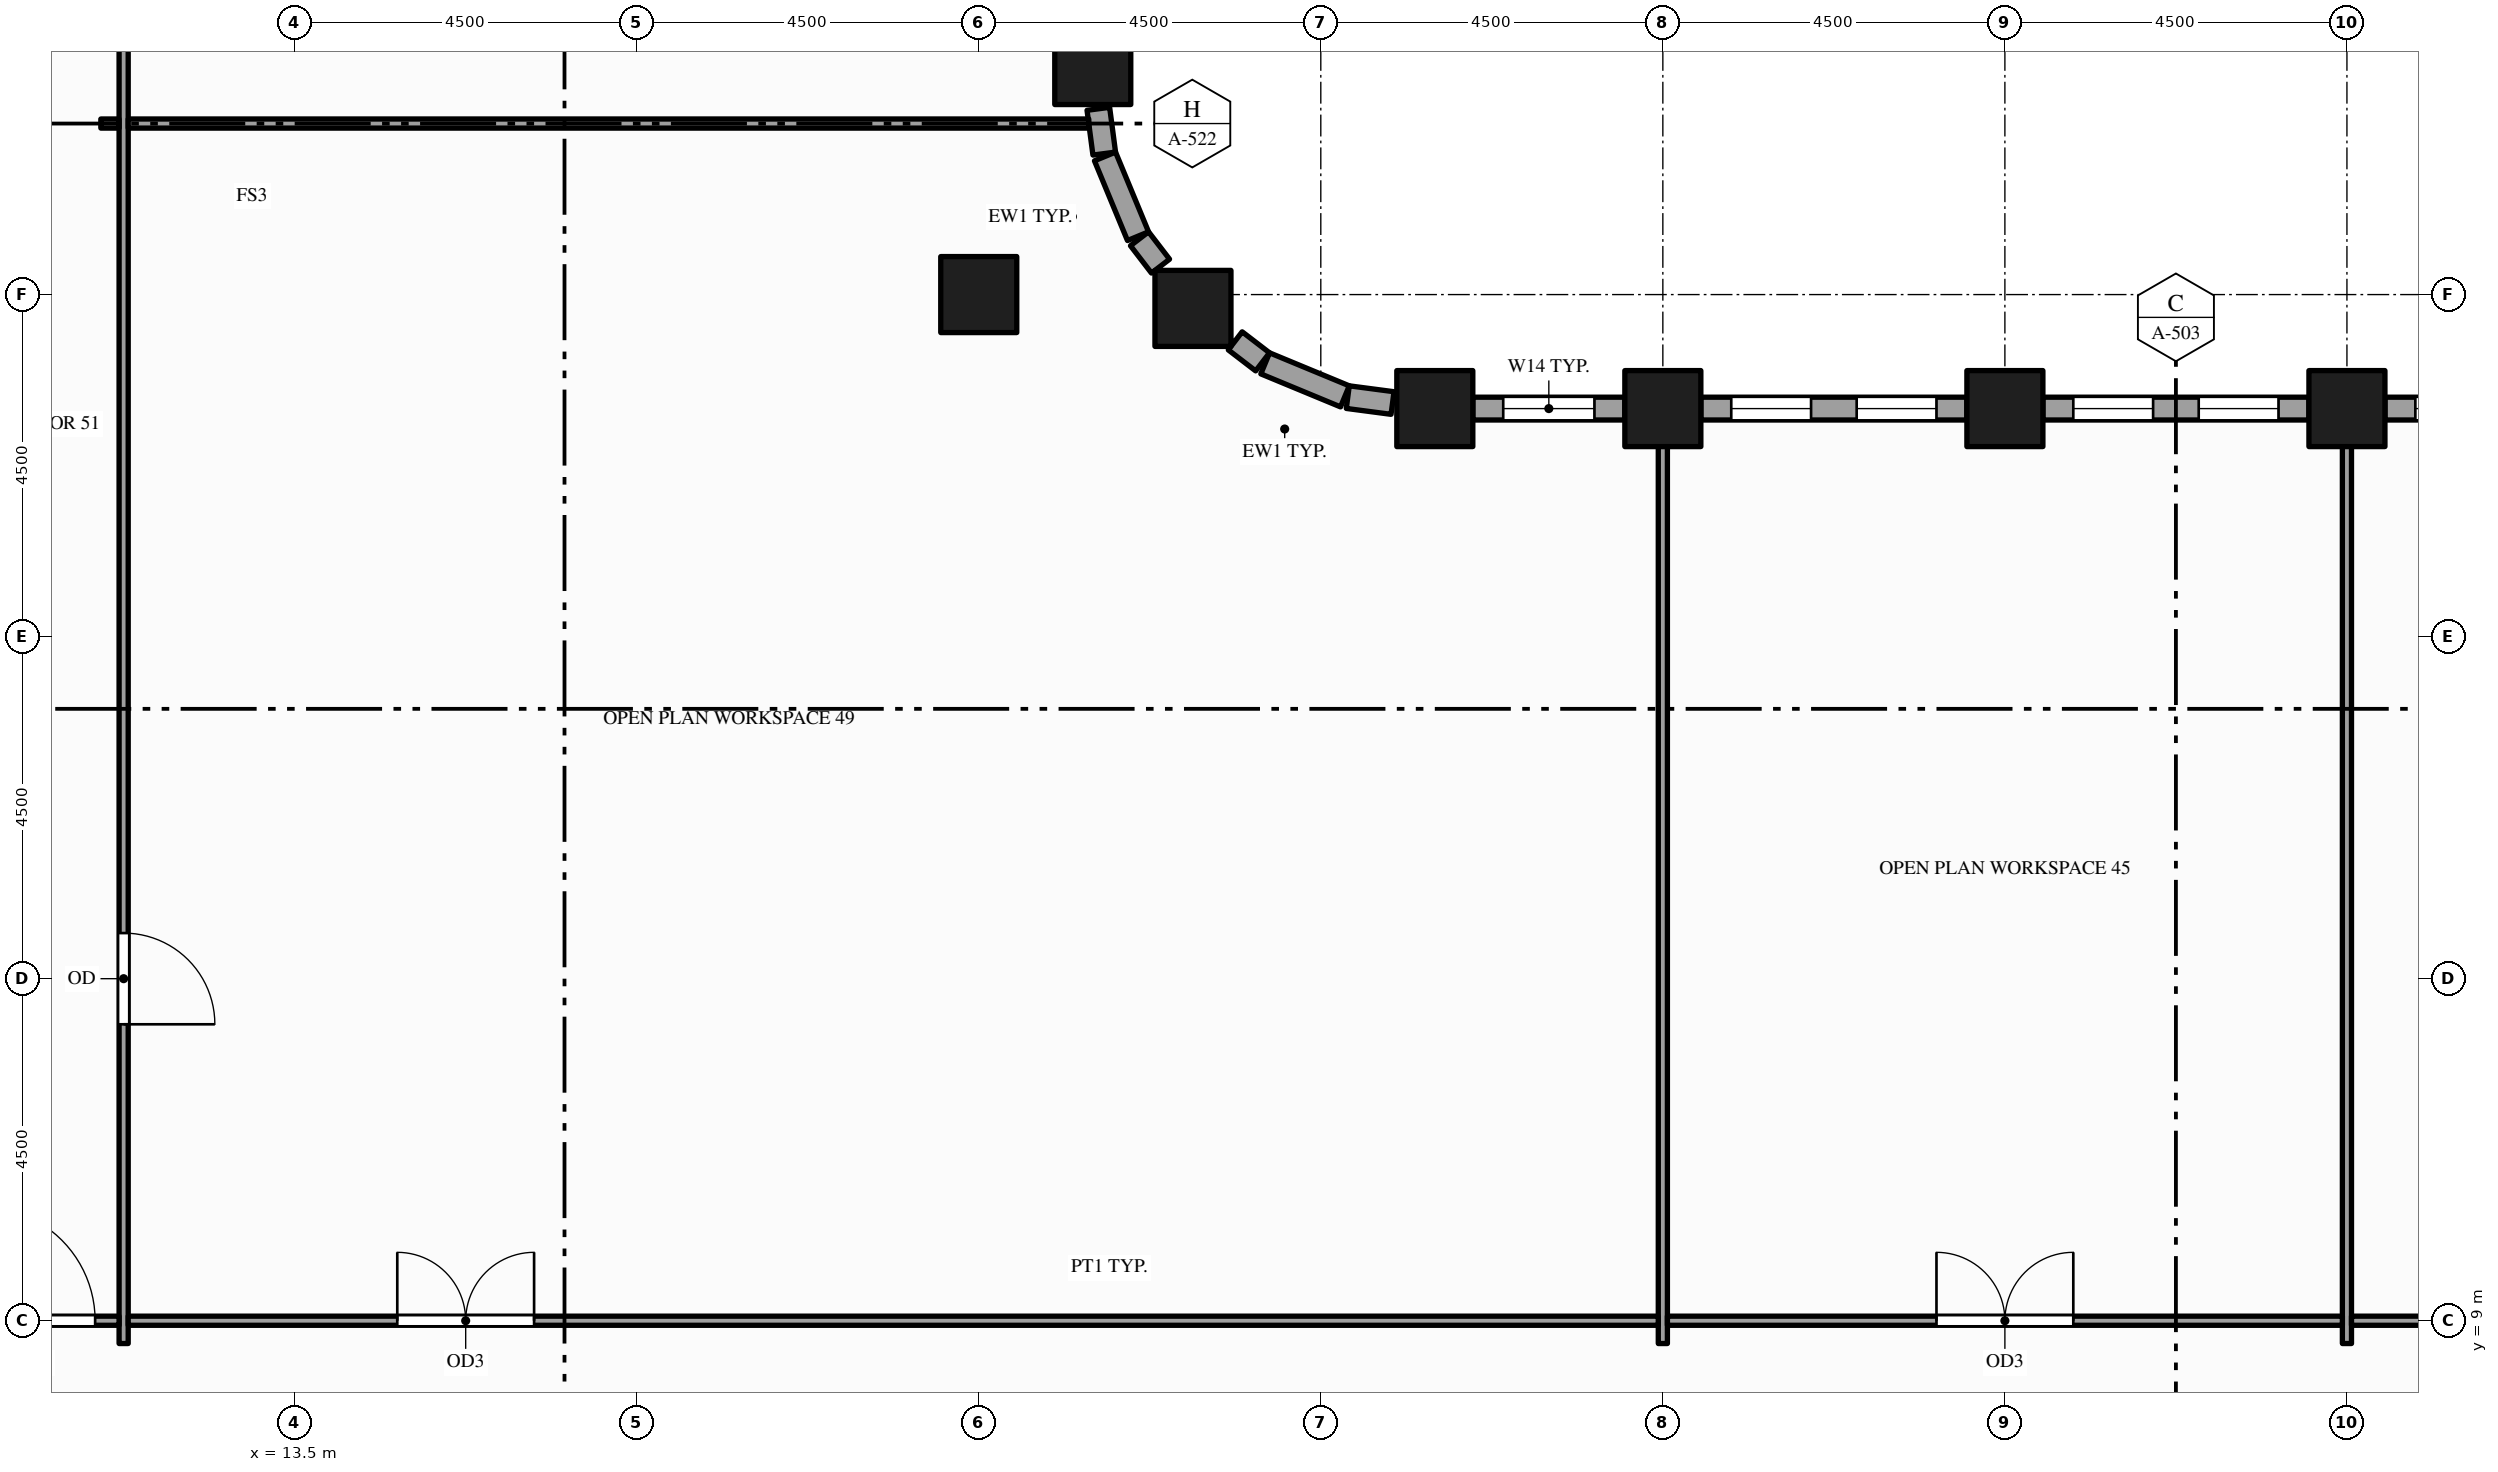
"""IFC4 building model, lengths in metres.
Left out: names, types, materials, properties, quantities, classifications, styles, units other than length and angle.
Written with IfcOpenShell. Run it as: python <this file> out.ifc"""

import sys

from ifc_helpers import new_model, si_unit, direction, frame, frame_2d, origin, origin_2d, place, context, subcontext, project, spatial, rectangle, hollow_rectangle, extrude, element, fill, save


model = new_model("IFC4")
c1 = context("Model", 3, precision=1e-05, world=origin(), true_north=direction((0.0, 1.0)))
c2 = subcontext(c1, "Body", "Model", "MODEL_VIEW")
j1 = project(units=[si_unit("LENGTHUNIT", "METRE"), si_unit("PLANEANGLEUNIT", "RADIAN")], contexts=[c1])
p1 = place(None, origin())
s1 = spatial("IfcSite", under=j1, at=p1, CompositionType="ELEMENT")
p2 = place(p1, origin())
s2 = spatial("IfcBuilding", under=s1, at=p2, CompositionType="ELEMENT")
p3 = place(p2, frame((0.0, 0.0, 103.0)))
s3 = spatial("IfcBuildingStorey", under=s2, at=p3, CompositionType="ELEMENT", Elevation=103.0)
for number, where, z_axis, x_axis in (
    (1, (22.5, 22.5, -0.15), (0.0, 0.0, 1.0), (1.0, 0.0, 0.0)),
    (2, (24.0, 25.5, -0.15), (0.0, 0.0, 1.0), (1.0, 0.0, 0.0)),
    (3, (25.318, 22.318, -0.15), (0.0, 0.0, 1.0), (1.0, 0.0, 0.0)),
    (4, (28.5, 21.0, -0.15), (0.0, 0.0, 1.0), (1.0, 0.0, 0.0)),
    (5, (31.5, 21.0, -0.15), (0.0, 0.0, 1.0), (1.0, 0.0, 0.0)),
    (6, (36.0, 21.0, -0.15), (0.0, 0.0, 1.0), (1.0, 0.0, 0.0)),
    (7, (40.5, 21.0, -0.15), (0.0, 0.0, 1.0), (1.0, 0.0, 0.0)),
):
    element("IfcColumn", number, at=place(p3, frame(where, z_axis=z_axis, x_axis=x_axis)), inside=s3, PredefinedType="COLUMN", context=c2, shape_type="SweptSolid", body=[
        extrude(hollow_rectangle(XDim=1.0, YDim=1.0, WallThickness=0.05, at=origin_2d()), origin(), (0.0, 0.0, 1.0), 4.0),
    ])
p4 = place(p3, frame((44.5, 21.0, 0.0), z_axis=(0.0, 0.0, 1.0), x_axis=(-1.0, 0.0, 0.0)))
e8 = element("IfcWall", 8, at=p4, inside=s3, PredefinedType="STANDARD", context=c2, shape_type="SweptSolid", body=[
    extrude(rectangle(XDim=3.5, YDim=0.3, at=frame_2d((1.75, 0.0))), origin(), (0.0, 0.0, 1.0), 3.154),
])
p5 = place(p4, frame((0.4, 0.0, 0.9)))
e9 = element("IfcOpeningElement", 9, at=p5, cuts=e8, PredefinedType="OPENING", context=c2, shape_type="SweptSolid", body=[
    extrude(rectangle(XDim=1.05, YDim=2.0, at=frame_2d((0.525, 1.0))), frame((0.0, 0.16, 0.0), z_axis=(0.0, -1.0, 0.0), x_axis=(1.0, 0.0, 0.0)), (0.0, 0.0, 1.0), 0.32),
])
p6 = place(p4, frame((2.05, 0.0, 0.9)))
e10 = element("IfcOpeningElement", 10, at=p6, cuts=e8, PredefinedType="OPENING", context=c2, shape_type="SweptSolid", body=[
    extrude(rectangle(XDim=1.05, YDim=2.0, at=frame_2d((0.525, 1.0))), frame((0.0, 0.16, 0.0), z_axis=(0.0, -1.0, 0.0), x_axis=(1.0, 0.0, 0.0)), (0.0, 0.0, 1.0), 0.32),
])
p7 = place(p3, frame((40.0, 21.0, 0.0), z_axis=(0.0, 0.0, 1.0), x_axis=(-1.0, 0.0, 0.0)))
e11 = element("IfcWall", 11, at=p7, inside=s3, PredefinedType="STANDARD", context=c2, shape_type="SweptSolid", body=[
    extrude(rectangle(XDim=3.5, YDim=0.3, at=frame_2d((1.75, 0.0))), origin(), (0.0, 0.0, 1.0), 3.154),
])
p8 = place(p7, frame((0.4, 0.0, 0.9)))
e12 = element("IfcOpeningElement", 12, at=p8, cuts=e11, PredefinedType="OPENING", context=c2, shape_type="SweptSolid", body=[
    extrude(rectangle(XDim=1.05, YDim=2.0, at=frame_2d((0.525, 1.0))), frame((0.0, 0.16, 0.0), z_axis=(0.0, -1.0, 0.0), x_axis=(1.0, 0.0, 0.0)), (0.0, 0.0, 1.0), 0.32),
])
p9 = place(p7, frame((2.05, 0.0, 0.9)))
e13 = element("IfcOpeningElement", 13, at=p9, cuts=e11, PredefinedType="OPENING", context=c2, shape_type="SweptSolid", body=[
    extrude(rectangle(XDim=1.05, YDim=2.0, at=frame_2d((0.525, 1.0))), frame((0.0, 0.16, 0.0), z_axis=(0.0, -1.0, 0.0), x_axis=(1.0, 0.0, 0.0)), (0.0, 0.0, 1.0), 0.32),
])
p10 = place(p3, frame((35.5, 21.0, 0.0), z_axis=(0.0, 0.0, 1.0), x_axis=(-1.0, 0.0, 0.0)))
e14 = element("IfcWall", 14, at=p10, inside=s3, PredefinedType="STANDARD", context=c2, shape_type="SweptSolid", body=[
    extrude(rectangle(XDim=3.5, YDim=0.3, at=frame_2d((1.75, 0.0))), origin(), (0.0, 0.0, 1.0), 3.154),
])
p11 = place(p10, frame((0.4, 0.0, 0.9)))
e15 = element("IfcOpeningElement", 15, at=p11, cuts=e14, PredefinedType="OPENING", context=c2, shape_type="SweptSolid", body=[
    extrude(rectangle(XDim=1.05, YDim=2.0, at=frame_2d((0.525, 1.0))), frame((0.0, 0.16, 0.0), z_axis=(0.0, -1.0, 0.0), x_axis=(1.0, 0.0, 0.0)), (0.0, 0.0, 1.0), 0.32),
])
p12 = place(p10, frame((2.05, 0.0, 0.9)))
e16 = element("IfcOpeningElement", 16, at=p12, cuts=e14, PredefinedType="OPENING", context=c2, shape_type="SweptSolid", body=[
    extrude(rectangle(XDim=1.05, YDim=2.0, at=frame_2d((0.525, 1.0))), frame((0.0, 0.16, 0.0), z_axis=(0.0, -1.0, 0.0), x_axis=(1.0, 0.0, 0.0)), (0.0, 0.0, 1.0), 0.32),
])
p13 = place(p3, frame((31.0, 21.0, 0.0), z_axis=(0.0, 0.0, 1.0), x_axis=(-1.0, 0.0, 0.0)))
e17 = element("IfcWall", 17, at=p13, inside=s3, PredefinedType="STANDARD", context=c2, shape_type="SweptSolid", body=[
    extrude(rectangle(XDim=2.0, YDim=0.3, at=frame_2d((1.0, 0.0))), origin(), (0.0, 0.0, 1.0), 3.154),
])
p14 = place(p13, frame((0.4, 0.0, 0.9)))
e18 = element("IfcOpeningElement", 18, at=p14, cuts=e17, PredefinedType="OPENING", context=c2, shape_type="SweptSolid", body=[
    extrude(rectangle(XDim=1.2, YDim=2.0, at=frame_2d((0.6, 1.0))), frame((0.0, 0.16, 0.0), z_axis=(0.0, -1.0, 0.0), x_axis=(1.0, 0.0, 0.0)), (0.0, 0.0, 1.0), 0.32),
])
p15 = place(p3, frame((27.944, 21.073, 0.0), z_axis=(0.0, 0.0, 1.0), x_axis=(-0.991420685839, 0.130709692412, 0.0)))
e19 = element("IfcWall", 19, at=p15, inside=s3, PredefinedType="STANDARD", context=c2, shape_type="SweptSolid", body=[
    extrude(rectangle(XDim=0.594, YDim=0.3, at=frame_2d((0.297, 0.0))), origin(), (0.0, 0.0, 1.0), 3.154),
])
p16 = place(p3, frame((27.317, 21.161, 0.0), z_axis=(0.0, 0.0, 1.0), x_axis=(-0.923914616768, 0.382598720491, 0.0)))
e20 = element("IfcWall", 20, at=p16, inside=s3, PredefinedType="STANDARD", context=c2, shape_type="SweptSolid", body=[
    extrude(rectangle(XDim=1.135, YDim=0.3, at=frame_2d((0.568, 0.0))), origin(), (0.0, 0.0, 1.0), 2.938),
])
p17 = place(p3, frame((26.234, 21.615, 0.0), z_axis=(0.0, 0.0, 1.0), x_axis=(-0.793563062559, 0.608488016104, 0.0)))
e21 = element("IfcWall", 21, at=p17, inside=s3, PredefinedType="STANDARD", context=c2, shape_type="SweptSolid", body=[
    extrude(rectangle(XDim=0.454, YDim=0.3, at=frame_2d((0.227, 0.0))), origin(), (0.0, 0.0, 1.0), 3.154),
])
p18 = place(p3, frame((24.891, 22.874, 0.0), z_axis=(0.0, 0.0, 1.0), x_axis=(-0.608488016104, 0.793563062559, 0.0)))
e22 = element("IfcWall", 22, at=p18, inside=s3, PredefinedType="STANDARD", context=c2, shape_type="SweptSolid", body=[
    extrude(rectangle(XDim=0.454, YDim=0.3, at=frame_2d((0.227, 0.0))), origin(), (0.0, 0.0, 1.0), 2.76),
])
p19 = place(p3, frame((24.595, 23.268, 0.0), z_axis=(0.0, 0.0, 1.0), x_axis=(-0.382598720491, 0.923914616768, 0.0)))
e23 = element("IfcWall", 23, at=p19, inside=s3, PredefinedType="STANDARD", context=c2, shape_type="SweptSolid", body=[
    extrude(rectangle(XDim=1.135, YDim=0.3, at=frame_2d((0.568, 0.0))), origin(), (0.0, 0.0, 1.0), 3.154),
])
p20 = place(p3, frame((24.151, 24.355, 0.0), z_axis=(0.0, 0.0, 1.0), x_axis=(-0.130709692412, 0.991420685839, 0.0)))
e24 = element("IfcWall", 24, at=p20, inside=s3, PredefinedType="STANDARD", context=c2, shape_type="SweptSolid", body=[
    extrude(rectangle(XDim=0.594, YDim=0.3, at=frame_2d((0.297, 0.0))), origin(), (0.0, 0.0, 1.0), 3.154),
])
p21 = place(p3, frame((11.25, 8.7, 0.0), z_axis=(0.0, 0.0, 1.0), x_axis=(0.0, 1.0, 0.0)))
e25 = element("IfcWall", 25, at=p21, inside=s3, PredefinedType="PARTITIONING", context=c2, shape_type="SweptSolid", body=[
    extrude(rectangle(XDim=23.1, YDim=0.12, at=frame_2d((11.55, 0.0))), origin(), (0.0, 0.0, 1.0), 2.6),
])
p22 = place(p21, frame((18.925, 0.0, 0.0)))
e26 = element("IfcOpeningElement", 26, at=p22, cuts=e25, PredefinedType="OPENING", context=c2, shape_type="SweptSolid", body=[
    extrude(rectangle(XDim=1.0, YDim=2.1, at=frame_2d((0.5, 1.05))), frame((0.0, 0.07, 0.0), z_axis=(0.0, -1.0, 0.0), x_axis=(1.0, 0.0, 0.0)), (0.0, 0.0, 1.0), 0.14),
])
p23 = place(p21, frame((4.2, 0.0, 0.0)))
e27 = element("IfcOpeningElement", 27, at=p23, cuts=e25, PredefinedType="OPENING", context=c2, shape_type="SweptSolid", body=[
    extrude(rectangle(XDim=1.2, YDim=2.1, at=frame_2d((0.6, 1.05))), frame((0.0, 0.07, 0.0), z_axis=(0.0, -1.0, 0.0), x_axis=(1.0, 0.0, 0.0)), (0.0, 0.0, 1.0), 0.14),
])
for number, where, z_axis, x_axis in (
    (28, (31.5, 8.7, 0.0), (0.0, 0.0, 1.0), (0.0, 1.0, 0.0)),
    (29, (40.5, 8.7, 0.0), (0.0, 0.0, 1.0), (0.0, 1.0, 0.0)),
):
    element("IfcWall", number, at=place(p3, frame(where, z_axis=z_axis, x_axis=x_axis)), inside=s3, PredefinedType="PARTITIONING", context=c2, shape_type="SweptSolid", body=[
        extrude(rectangle(XDim=12.15, YDim=0.12, at=frame_2d((6.075, 0.0))), origin(), (0.0, 0.0, 1.0), 2.938),
    ])
p24 = place(p3, frame((9.06, 9.0, 0.0), z_axis=(0.0, 0.0, 1.0), x_axis=(1.0, 0.0, 0.0)))
e30 = element("IfcWall", 30, at=p24, inside=s3, PredefinedType="PARTITIONING", context=c2, shape_type="SweptSolid", body=[
    extrude(rectangle(XDim=2.13, YDim=0.12, at=frame_2d((1.065, 0.0))), origin(), (0.0, 0.0, 1.0), 2.938),
])
p25 = place(p24, frame((0.315, 0.0, 0.0)))
e31 = element("IfcOpeningElement", 31, at=p25, cuts=e30, PredefinedType="OPENING", context=c2, shape_type="SweptSolid", body=[
    extrude(rectangle(XDim=1.5, YDim=2.1, at=frame_2d((0.75, 1.05))), frame((0.0, 0.07, 0.0), z_axis=(0.0, -1.0, 0.0), x_axis=(1.0, 0.0, 0.0)), (0.0, 0.0, 1.0), 0.14),
])
p26 = place(p3, frame((11.31, 9.0, 0.0), z_axis=(0.0, 0.0, 1.0), x_axis=(1.0, 0.0, 0.0)))
e32 = element("IfcWall", 32, at=p26, inside=s3, PredefinedType="PARTITIONING", context=c2, shape_type="SweptSolid", body=[
    extrude(rectangle(XDim=20.13, YDim=0.12, at=frame_2d((10.065, 0.0))), origin(), (0.0, 0.0, 1.0), 2.76),
])
p27 = place(p26, frame((3.54, 0.0, 0.0)))
e33 = element("IfcOpeningElement", 33, at=p27, cuts=e32, PredefinedType="OPENING", context=c2, shape_type="SweptSolid", body=[
    extrude(rectangle(XDim=1.8, YDim=2.1, at=frame_2d((0.9, 1.05))), frame((0.0, 0.07, 0.0), z_axis=(0.0, -1.0, 0.0), x_axis=(1.0, 0.0, 0.0)), (0.0, 0.0, 1.0), 0.14),
])
p28 = place(p3, frame((31.56, 9.0, 0.0), z_axis=(0.0, 0.0, 1.0), x_axis=(1.0, 0.0, 0.0)))
e34 = element("IfcWall", 34, at=p28, inside=s3, PredefinedType="PARTITIONING", context=c2, shape_type="SweptSolid", body=[
    extrude(rectangle(XDim=8.88, YDim=0.12, at=frame_2d((4.44, 0.0))), origin(), (0.0, 0.0, 1.0), 2.938),
])
p29 = place(p28, frame((3.54, 0.0, 0.0)))
e35 = element("IfcOpeningElement", 35, at=p29, cuts=e34, PredefinedType="OPENING", context=c2, shape_type="SweptSolid", body=[
    extrude(rectangle(XDim=1.8, YDim=2.1, at=frame_2d((0.9, 1.05))), frame((0.0, 0.07, 0.0), z_axis=(0.0, -1.0, 0.0), x_axis=(1.0, 0.0, 0.0)), (0.0, 0.0, 1.0), 0.14),
])
p30 = place(p3, frame((40.56, 9.0, 0.0), z_axis=(0.0, 0.0, 1.0), x_axis=(1.0, 0.0, 0.0)))
e36 = element("IfcWall", 36, at=p30, inside=s3, PredefinedType="PARTITIONING", context=c2, shape_type="SweptSolid", body=[
    extrude(rectangle(XDim=4.38, YDim=0.12, at=frame_2d((2.19, 0.0))), origin(), (0.0, 0.0, 1.0), 2.938),
])
p31 = place(p30, frame((1.59, 0.0, 0.0)))
e37 = element("IfcOpeningElement", 37, at=p31, cuts=e36, PredefinedType="OPENING", context=c2, shape_type="SweptSolid", body=[
    extrude(rectangle(XDim=1.2, YDim=2.1, at=frame_2d((0.6, 1.05))), frame((0.0, 0.07, 0.0), z_axis=(0.0, -1.0, 0.0), x_axis=(1.0, 0.0, 0.0)), (0.0, 0.0, 1.0), 0.14),
])
p32 = place(p3, frame((10.95, 24.75, 0.0), z_axis=(0.0, 0.0, 1.0), x_axis=(1.0, 0.0, 0.0)))
e38 = element("IfcWall", 38, at=p32, inside=s3, PredefinedType="PARTITIONING", context=c2, shape_type="SweptSolid", body=[
    extrude(rectangle(XDim=0.24, YDim=0.12, at=frame_2d((0.12, 0.0))), origin(), (0.0, 0.0, 1.0), 2.938),
])
p33 = place(p3, frame((11.31, 24.75, 0.0), z_axis=(0.0, 0.0, 1.0), x_axis=(1.0, 0.0, 0.0)))
e39 = element("IfcWall", 39, at=p33, inside=s3, PredefinedType="PARTITIONING", context=c2, shape_type="SweptSolid", body=[
    extrude(rectangle(XDim=12.637, YDim=0.12, at=frame_2d((6.319, 0.0))), origin(), (0.0, 0.0, 1.0), 2.938),
])
p34 = place(p6, origin())
e40 = element("IfcWindow", 40, at=p34, inside=s3, PartitioningType="SINGLE_PANEL", PredefinedType="WINDOW", context=c2, shape_type="SweptSolid", body=[
    extrude(rectangle(XDim=1.05, YDim=2.0, at=frame_2d((0.525, 1.0))), frame((0.0, 0.03, 0.0), z_axis=(0.0, -1.0, 0.0), x_axis=(1.0, 0.0, 0.0)), (0.0, 0.0, 1.0), 0.06),
])
fill(e10, e40)
p35 = place(p8, origin())
e41 = element("IfcWindow", 41, at=p35, inside=s3, PartitioningType="SINGLE_PANEL", PredefinedType="WINDOW", context=c2, shape_type="SweptSolid", body=[
    extrude(rectangle(XDim=1.05, YDim=2.0, at=frame_2d((0.525, 1.0))), frame((0.0, 0.03, 0.0), z_axis=(0.0, -1.0, 0.0), x_axis=(1.0, 0.0, 0.0)), (0.0, 0.0, 1.0), 0.06),
])
fill(e12, e41)
p36 = place(p9, origin())
e42 = element("IfcWindow", 42, at=p36, inside=s3, PartitioningType="SINGLE_PANEL", PredefinedType="WINDOW", context=c2, shape_type="SweptSolid", body=[
    extrude(rectangle(XDim=1.05, YDim=2.0, at=frame_2d((0.525, 1.0))), frame((0.0, 0.03, 0.0), z_axis=(0.0, -1.0, 0.0), x_axis=(1.0, 0.0, 0.0)), (0.0, 0.0, 1.0), 0.06),
])
fill(e13, e42)
p37 = place(p11, origin())
e43 = element("IfcWindow", 43, at=p37, inside=s3, PartitioningType="SINGLE_PANEL", PredefinedType="WINDOW", context=c2, shape_type="SweptSolid", body=[
    extrude(rectangle(XDim=1.05, YDim=2.0, at=frame_2d((0.525, 1.0))), frame((0.0, 0.03, 0.0), z_axis=(0.0, -1.0, 0.0), x_axis=(1.0, 0.0, 0.0)), (0.0, 0.0, 1.0), 0.06),
])
fill(e15, e43)
p38 = place(p12, origin())
e44 = element("IfcWindow", 44, at=p38, inside=s3, PartitioningType="SINGLE_PANEL", PredefinedType="WINDOW", context=c2, shape_type="SweptSolid", body=[
    extrude(rectangle(XDim=1.05, YDim=2.0, at=frame_2d((0.525, 1.0))), frame((0.0, 0.03, 0.0), z_axis=(0.0, -1.0, 0.0), x_axis=(1.0, 0.0, 0.0)), (0.0, 0.0, 1.0), 0.06),
])
fill(e16, e44)
p39 = place(p14, origin())
e45 = element("IfcWindow", 45, at=p39, inside=s3, PartitioningType="SINGLE_PANEL", PredefinedType="WINDOW", context=c2, shape_type="SweptSolid", body=[
    extrude(rectangle(XDim=1.2, YDim=2.0, at=frame_2d((0.6, 1.0))), frame((0.0, 0.03, 0.0), z_axis=(0.0, -1.0, 0.0), x_axis=(1.0, 0.0, 0.0)), (0.0, 0.0, 1.0), 0.06),
])
fill(e18, e45)
p40 = place(p29, origin())
e46 = element("IfcDoor", 46, at=p40, inside=s3, OperationType="DOUBLE_DOOR_SINGLE_SWING", PredefinedType="DOOR", context=c2, shape_type="SweptSolid", body=[
    extrude(rectangle(XDim=1.8, YDim=2.1, at=frame_2d((0.9, 1.05))), frame((0.0, 0.025, 0.0), z_axis=(0.0, -1.0, 0.0), x_axis=(1.0, 0.0, 0.0)), (0.0, 0.0, 1.0), 0.05),
])
fill(e35, e46)
p41 = place(p27, origin())
e47 = element("IfcDoor", 47, at=p41, inside=s3, OperationType="DOUBLE_DOOR_SINGLE_SWING", PredefinedType="DOOR", context=c2, shape_type="SweptSolid", body=[
    extrude(rectangle(XDim=1.8, YDim=2.1, at=frame_2d((0.9, 1.05))), frame((0.0, 0.025, 0.0), z_axis=(0.0, -1.0, 0.0), x_axis=(1.0, 0.0, 0.0)), (0.0, 0.0, 1.0), 0.05),
])
fill(e33, e47)
p42 = place(p25, origin())
e48 = element("IfcDoor", 48, at=p42, inside=s3, OperationType="SINGLE_SWING_LEFT", PredefinedType="DOOR", context=c2, shape_type="SweptSolid", body=[
    extrude(rectangle(XDim=1.5, YDim=2.1, at=frame_2d((0.75, 1.05))), frame((0.0, 0.025, 0.0), z_axis=(0.0, -1.0, 0.0), x_axis=(1.0, 0.0, 0.0)), (0.0, 0.0, 1.0), 0.05),
])
fill(e31, e48)
p43 = place(p23, origin())
e49 = element("IfcDoor", 49, at=p43, inside=s3, OperationType="SINGLE_SWING_LEFT", PredefinedType="DOOR", context=c2, shape_type="SweptSolid", body=[
    extrude(rectangle(XDim=1.2, YDim=2.1, at=frame_2d((0.6, 1.05))), frame((0.0, 0.025, 0.0), z_axis=(0.0, -1.0, 0.0), x_axis=(1.0, 0.0, 0.0)), (0.0, 0.0, 1.0), 0.05),
])
fill(e27, e49)
save(model, sys.argv[1])
